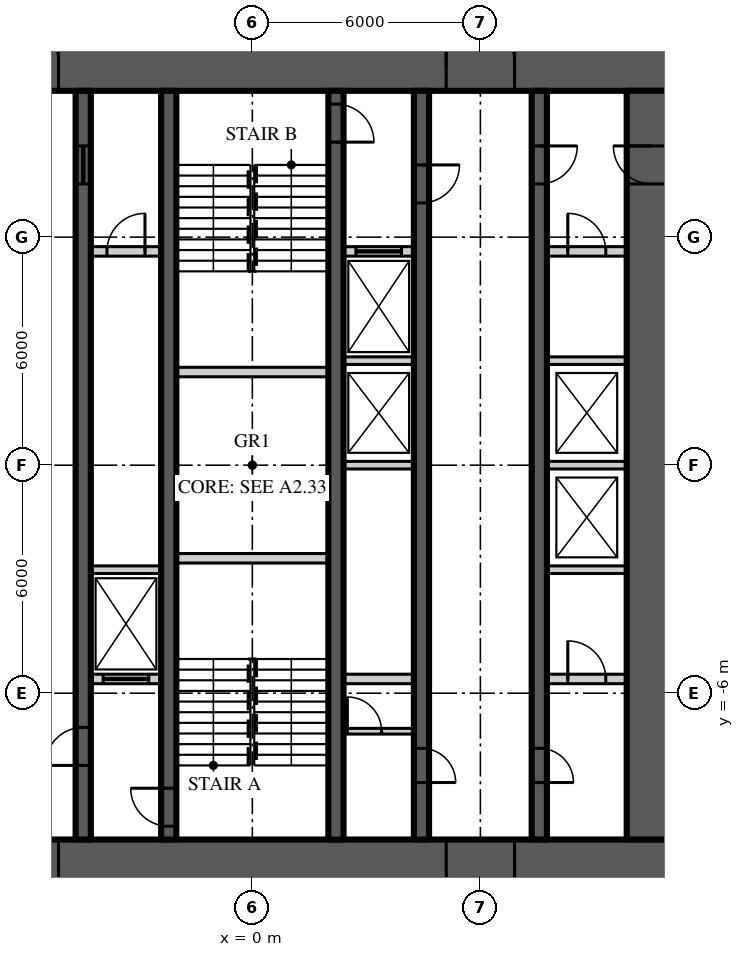
"""IFC4 building model, lengths in metres.
Left out: names, types, materials, properties, quantities, classifications, styles, units other than length and angle.
Written with IfcOpenShell. Run it as: python <this file> out.ifc"""

import sys

from ifc_helpers import new_model, si_unit, direction, frame, frame_2d, origin, place, context, subcontext, project, spatial, rectangle, extrude, element, fill, save


model = new_model("IFC4")
c1 = context("Model", 3, precision=1e-05, world=origin(), true_north=direction((0.0, 1.0)))
c2 = subcontext(c1, "Body", "Model", "MODEL_VIEW")
j1 = project(units=[si_unit("LENGTHUNIT", "METRE"), si_unit("PLANEANGLEUNIT", "RADIAN")], contexts=[c1])
p1 = place(None, origin())
s1 = spatial("IfcSite", under=j1, at=p1, CompositionType="ELEMENT")
p2 = place(p1, origin())
s2 = spatial("IfcBuilding", under=s1, at=p2, CompositionType="ELEMENT")
p3 = place(p2, frame((0.0, 0.0, 251.7)))
s3 = spatial("IfcBuildingStorey", under=s2, at=p3, CompositionType="ELEMENT", Elevation=251.7)
p4 = place(p3, frame((-11.15, 10.5, 0.0), z_axis=(0.0, 0.0, 1.0), x_axis=(1.0, 0.0, 0.0)))
e1 = element("IfcWall", 1, at=p4, inside=s3, PredefinedType="SHEAR", context=c2, shape_type="SweptSolid", body=[
    extrude(rectangle(XDim=22.3, YDim=1.3, at=frame_2d((11.15, 0.0))), origin(), (0.0, 0.0, 1.0), 3.9),
])
p5 = place(p4, frame((4.25, 0.0, 0.0)))
e2 = element("IfcOpeningElement", 2, at=p5, cuts=e1, PredefinedType="OPENING", context=c2, shape_type="SweptSolid", body=[
    extrude(rectangle(XDim=1.8, YDim=2.2, at=frame_2d((0.9, 1.1))), frame((0.0, 0.66, 0.0), z_axis=(0.0, -1.0, 0.0), x_axis=(1.0, 0.0, 0.0)), (0.0, 0.0, 1.0), 1.32),
])
p6 = place(p4, frame((16.25, 0.0, 0.0)))
e3 = element("IfcOpeningElement", 3, at=p6, cuts=e1, PredefinedType="OPENING", context=c2, shape_type="SweptSolid", body=[
    extrude(rectangle(XDim=1.8, YDim=2.2, at=frame_2d((0.9, 1.1))), frame((0.0, 0.66, 0.0), z_axis=(0.0, -1.0, 0.0), x_axis=(1.0, 0.0, 0.0)), (0.0, 0.0, 1.0), 1.32),
])
p7 = place(p3, frame((11.15, -10.5, 0.0), z_axis=(0.0, 0.0, 1.0), x_axis=(-1.0, 0.0, 0.0)))
e4 = element("IfcWall", 4, at=p7, inside=s3, PredefinedType="SHEAR", context=c2, shape_type="SweptSolid", body=[
    extrude(rectangle(XDim=22.3, YDim=1.3, at=frame_2d((11.15, 0.0))), origin(), (0.0, 0.0, 1.0), 3.9),
])
p8 = place(p7, frame((16.25, 0.0, 0.0)))
e5 = element("IfcOpeningElement", 5, at=p8, cuts=e4, PredefinedType="OPENING", context=c2, shape_type="SweptSolid", body=[
    extrude(rectangle(XDim=1.8, YDim=2.2, at=frame_2d((0.9, 1.1))), frame((0.0, 0.66, 0.0), z_axis=(0.0, -1.0, 0.0), x_axis=(1.0, 0.0, 0.0)), (0.0, 0.0, 1.0), 1.32),
])
p9 = place(p7, frame((4.25, 0.0, 0.0)))
e6 = element("IfcOpeningElement", 6, at=p9, cuts=e4, PredefinedType="OPENING", context=c2, shape_type="SweptSolid", body=[
    extrude(rectangle(XDim=1.8, YDim=2.2, at=frame_2d((0.9, 1.1))), frame((0.0, 0.66, 0.0), z_axis=(0.0, -1.0, 0.0), x_axis=(1.0, 0.0, 0.0)), (0.0, 0.0, 1.0), 1.32),
])
p10 = place(p3, frame((10.5, -9.85, 0.0), z_axis=(0.0, 0.0, 1.0), x_axis=(0.0, 1.0, 0.0)))
e7 = element("IfcWall", 7, at=p10, inside=s3, PredefinedType="SHEAR", context=c2, shape_type="SweptSolid", body=[
    extrude(rectangle(XDim=19.7, YDim=1.3, at=frame_2d((9.85, 0.0))), origin(), (0.0, 0.0, 1.0), 3.9),
])
p11 = place(p10, frame((17.25, 0.0, 0.0)))
e8 = element("IfcOpeningElement", 8, at=p11, cuts=e7, PredefinedType="OPENING", context=c2, shape_type="SweptSolid", body=[
    extrude(rectangle(XDim=1.0, YDim=2.2, at=frame_2d((0.5, 1.1))), frame((0.0, 0.66, 0.0), z_axis=(0.0, -1.0, 0.0), x_axis=(1.0, 0.0, 0.0)), (0.0, 0.0, 1.0), 1.32),
])
p12 = place(p3, frame((7.55, 9.85, 0.0), z_axis=(0.0, 0.0, 1.0), x_axis=(0.0, -1.0, 0.0)))
e9 = element("IfcWall", 9, at=p12, inside=s3, PredefinedType="SHEAR", context=c2, shape_type="SweptSolid", body=[
    extrude(rectangle(XDim=19.7, YDim=0.4, at=frame_2d((9.85, 0.0))), origin(), (0.0, 0.0, 1.0), 3.9),
])
p13 = place(p12, frame((1.45, 0.0, 0.0)))
e10 = element("IfcOpeningElement", 10, at=p13, cuts=e9, PredefinedType="OPENING", context=c2, shape_type="SweptSolid", body=[
    extrude(rectangle(XDim=1.0, YDim=2.2, at=frame_2d((0.5, 1.1))), frame((0.0, 0.21, 0.0), z_axis=(0.0, -1.0, 0.0), x_axis=(1.0, 0.0, 0.0)), (0.0, 0.0, 1.0), 0.42),
])
p14 = place(p12, frame((17.3, 0.0, 0.0)))
e11 = element("IfcOpeningElement", 11, at=p14, cuts=e9, PredefinedType="OPENING", context=c2, shape_type="SweptSolid", body=[
    extrude(rectangle(XDim=0.9, YDim=2.1, at=frame_2d((0.45, 1.05))), frame((0.0, 0.21, 0.0), z_axis=(0.0, -1.0, 0.0), x_axis=(1.0, 0.0, 0.0)), (0.0, 0.0, 1.0), 0.42),
])
p15 = place(p3, frame((-4.45, -9.85, 0.0), z_axis=(0.0, 0.0, 1.0), x_axis=(0.0, 1.0, 0.0)))
e12 = element("IfcWall", 12, at=p15, inside=s3, PredefinedType="SHEAR", context=c2, shape_type="SweptSolid", body=[
    extrude(rectangle(XDim=19.7, YDim=0.4, at=frame_2d((9.85, 0.0))), origin(), (0.0, 0.0, 1.0), 3.9),
])
p16 = place(p15, frame((1.95, 0.0, 0.0)))
e13 = element("IfcOpeningElement", 13, at=p16, cuts=e12, PredefinedType="OPENING", context=c2, shape_type="SweptSolid", body=[
    extrude(rectangle(XDim=1.0, YDim=2.2, at=frame_2d((0.5, 1.1))), frame((0.0, 0.21, 0.0), z_axis=(0.0, -1.0, 0.0), x_axis=(1.0, 0.0, 0.0)), (0.0, 0.0, 1.0), 0.42),
])
p17 = place(p15, frame((17.25, 0.0, 0.0)))
e14 = element("IfcOpeningElement", 14, at=p17, cuts=e12, PredefinedType="OPENING", context=c2, shape_type="SweptSolid", body=[
    extrude(rectangle(XDim=1.0, YDim=2.1, at=frame_2d((0.5, 1.05))), frame((0.0, 0.21, 0.0), z_axis=(0.0, -1.0, 0.0), x_axis=(1.0, 0.0, 0.0)), (0.0, 0.0, 1.0), 0.42),
])
p18 = place(p3, frame((4.45, 9.85, 0.0), z_axis=(0.0, 0.0, 1.0), x_axis=(0.0, -1.0, 0.0)))
e15 = element("IfcWall", 15, at=p18, inside=s3, PredefinedType="SHEAR", context=c2, shape_type="SweptSolid", body=[
    extrude(rectangle(XDim=19.7, YDim=0.4, at=frame_2d((9.85, 0.0))), origin(), (0.0, 0.0, 1.0), 3.9),
])
p19 = place(p18, frame((1.95, 0.0, 0.0)))
e16 = element("IfcOpeningElement", 16, at=p19, cuts=e15, PredefinedType="OPENING", context=c2, shape_type="SweptSolid", body=[
    extrude(rectangle(XDim=1.0, YDim=2.2, at=frame_2d((0.5, 1.1))), frame((0.0, 0.21, 0.0), z_axis=(0.0, -1.0, 0.0), x_axis=(1.0, 0.0, 0.0)), (0.0, 0.0, 1.0), 0.42),
])
p20 = place(p18, frame((17.3, 0.0, 0.0)))
e17 = element("IfcOpeningElement", 17, at=p20, cuts=e15, PredefinedType="OPENING", context=c2, shape_type="SweptSolid", body=[
    extrude(rectangle(XDim=0.9, YDim=2.1, at=frame_2d((0.45, 1.05))), frame((0.0, 0.21, 0.0), z_axis=(0.0, -1.0, 0.0), x_axis=(1.0, 0.0, 0.0)), (0.0, 0.0, 1.0), 0.42),
])
p21 = place(p3, frame((-2.2, -9.85, 0.0), z_axis=(0.0, 0.0, 1.0), x_axis=(0.0, 1.0, 0.0)))
e18 = element("IfcWall", 18, at=p21, inside=s3, PredefinedType="SHEAR", context=c2, shape_type="SweptSolid", body=[
    extrude(rectangle(XDim=19.7, YDim=0.4, at=frame_2d((9.85, 0.0))), origin(), (0.0, 0.0, 1.0), 3.9),
])
p22 = place(p21, frame((0.35, 0.0, 0.0)))
e19 = element("IfcOpeningElement", 19, at=p22, cuts=e18, PredefinedType="OPENING", context=c2, shape_type="SweptSolid", body=[
    extrude(rectangle(XDim=1.0, YDim=2.2, at=frame_2d((0.5, 1.1))), frame((0.0, 0.21, 0.0), z_axis=(0.0, -1.0, 0.0), x_axis=(1.0, 0.0, 0.0)), (0.0, 0.0, 1.0), 0.42),
])
p23 = place(p3, frame((2.2, 9.85, 0.0), z_axis=(0.0, 0.0, 1.0), x_axis=(0.0, -1.0, 0.0)))
e20 = element("IfcWall", 20, at=p23, inside=s3, PredefinedType="SHEAR", context=c2, shape_type="SweptSolid", body=[
    extrude(rectangle(XDim=19.7, YDim=0.4, at=frame_2d((9.85, 0.0))), origin(), (0.0, 0.0, 1.0), 3.9),
])
p24 = place(p23, frame((0.35, 0.0, 0.0)))
e21 = element("IfcOpeningElement", 21, at=p24, cuts=e20, PredefinedType="OPENING", context=c2, shape_type="SweptSolid", body=[
    extrude(rectangle(XDim=1.0, YDim=2.2, at=frame_2d((0.5, 1.1))), frame((0.0, 0.21, 0.0), z_axis=(0.0, -1.0, 0.0), x_axis=(1.0, 0.0, 0.0)), (0.0, 0.0, 1.0), 0.42),
])
p25 = place(p3, frame((-4.25, 5.625, 0.0), z_axis=(0.0, 0.0, 1.0), x_axis=(1.0, 0.0, 0.0)))
e22 = element("IfcWall", 22, at=p25, inside=s3, PredefinedType="SOLIDWALL", context=c2, shape_type="SweptSolid", body=[
    extrude(rectangle(XDim=1.85, YDim=0.25, at=frame_2d((0.925, 0.0))), origin(), (0.0, 0.0, 1.0), 3.7),
])
p26 = place(p25, frame((0.425, 0.0, 0.0)))
e23 = element("IfcOpeningElement", 23, at=p26, cuts=e22, PredefinedType="OPENING", context=c2, shape_type="SweptSolid", body=[
    extrude(rectangle(XDim=1.0, YDim=2.2, at=frame_2d((0.5, 1.1))), frame((0.0, 0.135, 0.0), z_axis=(0.0, -1.0, 0.0), x_axis=(1.0, 0.0, 0.0)), (0.0, 0.0, 1.0), 0.27),
])
p27 = place(p3, frame((2.4, 5.625, 0.0), z_axis=(0.0, 0.0, 1.0), x_axis=(1.0, 0.0, 0.0)))
e24 = element("IfcWall", 24, at=p27, inside=s3, PredefinedType="SOLIDWALL", context=c2, shape_type="SweptSolid", body=[
    extrude(rectangle(XDim=1.85, YDim=0.25, at=frame_2d((0.925, 0.0))), origin(), (0.0, 0.0, 1.0), 3.7),
])
p28 = place(p27, frame((0.325, 0.0, 0.0)))
e25 = element("IfcOpeningElement", 25, at=p28, cuts=e24, PredefinedType="OPENING", context=c2, shape_type="SweptSolid", body=[
    extrude(rectangle(XDim=1.2, YDim=2.2, at=frame_2d((0.6, 1.1))), frame((0.0, 0.135, 0.0), z_axis=(0.0, -1.0, 0.0), x_axis=(1.0, 0.0, 0.0)), (0.0, 0.0, 1.0), 0.27),
])
p29 = place(p3, frame((7.75, 5.625, 0.0), z_axis=(0.0, 0.0, 1.0), x_axis=(1.0, 0.0, 0.0)))
e26 = element("IfcWall", 26, at=p29, inside=s3, PredefinedType="SOLIDWALL", context=c2, shape_type="SweptSolid", body=[
    extrude(rectangle(XDim=2.1, YDim=0.25, at=frame_2d((1.05, 0.0))), origin(), (0.0, 0.0, 1.0), 3.7),
])
p30 = place(p29, frame((0.55, 0.0, 0.0)))
e27 = element("IfcOpeningElement", 27, at=p30, cuts=e26, PredefinedType="OPENING", context=c2, shape_type="SweptSolid", body=[
    extrude(rectangle(XDim=1.0, YDim=2.2, at=frame_2d((0.5, 1.1))), frame((0.0, 0.135, 0.0), z_axis=(0.0, -1.0, 0.0), x_axis=(1.0, 0.0, 0.0)), (0.0, 0.0, 1.0), 0.27),
])
p31 = place(p3, frame((-4.25, -5.625, 0.0), z_axis=(0.0, 0.0, 1.0), x_axis=(1.0, 0.0, 0.0)))
e28 = element("IfcWall", 28, at=p31, inside=s3, PredefinedType="SOLIDWALL", context=c2, shape_type="SweptSolid", body=[
    extrude(rectangle(XDim=1.85, YDim=0.25, at=frame_2d((0.925, 0.0))), origin(), (0.0, 0.0, 1.0), 3.7),
])
p32 = place(p31, frame((0.325, 0.0, 0.0)))
e29 = element("IfcOpeningElement", 29, at=p32, cuts=e28, PredefinedType="OPENING", context=c2, shape_type="SweptSolid", body=[
    extrude(rectangle(XDim=1.2, YDim=2.2, at=frame_2d((0.6, 1.1))), frame((0.0, 0.135, 0.0), z_axis=(0.0, -1.0, 0.0), x_axis=(1.0, 0.0, 0.0)), (0.0, 0.0, 1.0), 0.27),
])
p33 = place(p3, frame((2.4, -5.625, 0.0), z_axis=(0.0, 0.0, 1.0), x_axis=(1.0, 0.0, 0.0)))
e30 = element("IfcWall", 30, at=p33, inside=s3, PredefinedType="SOLIDWALL", context=c2, shape_type="SweptSolid", body=[
    extrude(rectangle(XDim=1.85, YDim=0.25, at=frame_2d((0.925, 0.0))), origin(), (0.0, 0.0, 1.0), 3.7),
])
p34 = place(p3, frame((7.75, -5.625, 0.0), z_axis=(0.0, 0.0, 1.0), x_axis=(1.0, 0.0, 0.0)))
e31 = element("IfcWall", 31, at=p34, inside=s3, PredefinedType="SOLIDWALL", context=c2, shape_type="SweptSolid", body=[
    extrude(rectangle(XDim=2.1, YDim=0.25, at=frame_2d((1.05, 0.0))), origin(), (0.0, 0.0, 1.0), 3.7),
])
p35 = place(p34, frame((0.55, 0.0, 0.0)))
e32 = element("IfcOpeningElement", 32, at=p35, cuts=e31, PredefinedType="OPENING", context=c2, shape_type="SweptSolid", body=[
    extrude(rectangle(XDim=1.0, YDim=2.2, at=frame_2d((0.5, 1.1))), frame((0.0, 0.135, 0.0), z_axis=(0.0, -1.0, 0.0), x_axis=(1.0, 0.0, 0.0)), (0.0, 0.0, 1.0), 0.27),
])
for number, where, z_axis, x_axis in (
    (33, (-2.0, -2.45, 0.0), (0.0, 0.0, 1.0), (1.0, 0.0, 0.0)),
    (34, (-2.0, 2.45, 0.0), (0.0, 0.0, 1.0), (1.0, 0.0, 0.0)),
):
    element("IfcWall", number, at=place(p3, frame(where, z_axis=z_axis, x_axis=x_axis)), inside=s3, PredefinedType="SOLIDWALL", context=c2, shape_type="SweptSolid", body=[
        extrude(rectangle(XDim=4.0, YDim=0.25, at=frame_2d((2.0, 0.0))), origin(), (0.0, 0.0, 1.0), 3.7),
    ])
p36 = place(p3, frame((-4.25, -2.75, 0.0), z_axis=(0.0, 0.0, 1.0), x_axis=(1.0, 0.0, 0.0)))
e35 = element("IfcWall", 35, at=p36, inside=s3, PredefinedType="SOLIDWALL", context=c2, shape_type="SweptSolid", body=[
    extrude(rectangle(XDim=1.85, YDim=0.2, at=frame_2d((0.925, 0.0))), origin(), (0.0, 0.0, 1.0), 3.7),
])
p37 = place(p3, frame((7.75, -2.75, 0.0), z_axis=(0.0, 0.0, 1.0), x_axis=(1.0, 0.0, 0.0)))
e36 = element("IfcWall", 36, at=p37, inside=s3, PredefinedType="SOLIDWALL", context=c2, shape_type="SweptSolid", body=[
    extrude(rectangle(XDim=2.1, YDim=0.2, at=frame_2d((1.05, 0.0))), origin(), (0.0, 0.0, 1.0), 3.7),
])
p38 = place(p3, frame((2.4, 0.0, 0.0), z_axis=(0.0, 0.0, 1.0), x_axis=(1.0, 0.0, 0.0)))
e37 = element("IfcWall", 37, at=p38, inside=s3, PredefinedType="SOLIDWALL", context=c2, shape_type="SweptSolid", body=[
    extrude(rectangle(XDim=1.85, YDim=0.2, at=frame_2d((0.925, 0.0))), origin(), (0.0, 0.0, 1.0), 3.7),
])
p39 = place(p3, frame((7.75, 0.0, 0.0), z_axis=(0.0, 0.0, 1.0), x_axis=(1.0, 0.0, 0.0)))
e38 = element("IfcWall", 38, at=p39, inside=s3, PredefinedType="SOLIDWALL", context=c2, shape_type="SweptSolid", body=[
    extrude(rectangle(XDim=2.1, YDim=0.2, at=frame_2d((1.05, 0.0))), origin(), (0.0, 0.0, 1.0), 3.7),
])
p40 = place(p3, frame((2.4, 2.75, 0.0), z_axis=(0.0, 0.0, 1.0), x_axis=(1.0, 0.0, 0.0)))
e39 = element("IfcWall", 39, at=p40, inside=s3, PredefinedType="SOLIDWALL", context=c2, shape_type="SweptSolid", body=[
    extrude(rectangle(XDim=1.85, YDim=0.2, at=frame_2d((0.925, 0.0))), origin(), (0.0, 0.0, 1.0), 3.7),
])
p41 = place(p3, frame((7.75, 2.75, 0.0), z_axis=(0.0, 0.0, 1.0), x_axis=(1.0, 0.0, 0.0)))
e40 = element("IfcWall", 40, at=p41, inside=s3, PredefinedType="SOLIDWALL", context=c2, shape_type="SweptSolid", body=[
    extrude(rectangle(XDim=2.1, YDim=0.2, at=frame_2d((1.05, 0.0))), origin(), (0.0, 0.0, 1.0), 3.7),
])
p42 = place(p3, frame((2.4, -7.0, 0.0), z_axis=(0.0, 0.0, 1.0), x_axis=(1.0, 0.0, 0.0)))
e41 = element("IfcWall", 41, at=p42, inside=s3, PredefinedType="SOLIDWALL", context=c2, shape_type="SweptSolid", body=[
    extrude(rectangle(XDim=1.85, YDim=0.15, at=frame_2d((0.925, 0.0))), origin(), (0.0, 0.0, 1.0), 3.77),
])
p43 = place(p42, frame((0.1, 0.0, 0.0)))
e42 = element("IfcOpeningElement", 42, at=p43, cuts=e41, PredefinedType="OPENING", context=c2, shape_type="SweptSolid", body=[
    extrude(rectangle(XDim=0.9, YDim=2.1, at=frame_2d((0.45, 1.05))), frame((0.0, 0.085, 0.0), z_axis=(0.0, -1.0, 0.0), x_axis=(1.0, 0.0, 0.0)), (0.0, 0.0, 1.0), 0.17),
])
p44 = place(p5, origin())
e43 = element("IfcDoor", 43, at=p44, inside=s3, OperationType="DOUBLE_DOOR_DOUBLE_SWING", PredefinedType="DOOR", context=c2, shape_type="SweptSolid", body=[
    extrude(rectangle(XDim=1.8, YDim=2.2, at=frame_2d((0.9, 1.1))), frame((0.0, 0.025, 0.0), z_axis=(0.0, -1.0, 0.0), x_axis=(1.0, 0.0, 0.0)), (0.0, 0.0, 1.0), 0.05),
])
fill(e2, e43)
p45 = place(p8, origin())
e44 = element("IfcDoor", 44, at=p45, inside=s3, OperationType="DOUBLE_DOOR_DOUBLE_SWING", PredefinedType="DOOR", context=c2, shape_type="SweptSolid", body=[
    extrude(rectangle(XDim=1.8, YDim=2.2, at=frame_2d((0.9, 1.1))), frame((0.0, 0.025, 0.0), z_axis=(0.0, -1.0, 0.0), x_axis=(1.0, 0.0, 0.0)), (0.0, 0.0, 1.0), 0.05),
])
fill(e5, e44)
p46 = place(p6, origin())
e45 = element("IfcDoor", 45, at=p46, inside=s3, OperationType="DOUBLE_DOOR_DOUBLE_SWING", PredefinedType="DOOR", context=c2, shape_type="SweptSolid", body=[
    extrude(rectangle(XDim=1.8, YDim=2.2, at=frame_2d((0.9, 1.1))), frame((0.0, 0.025, 0.0), z_axis=(0.0, -1.0, 0.0), x_axis=(1.0, 0.0, 0.0)), (0.0, 0.0, 1.0), 0.05),
])
fill(e3, e45)
p47 = place(p9, origin())
e46 = element("IfcDoor", 46, at=p47, inside=s3, OperationType="DOUBLE_DOOR_DOUBLE_SWING", PredefinedType="DOOR", context=c2, shape_type="SweptSolid", body=[
    extrude(rectangle(XDim=1.8, YDim=2.2, at=frame_2d((0.9, 1.1))), frame((0.0, 0.025, 0.0), z_axis=(0.0, -1.0, 0.0), x_axis=(1.0, 0.0, 0.0)), (0.0, 0.0, 1.0), 0.05),
])
fill(e6, e46)
p48 = place(p13, origin())
e47 = element("IfcDoor", 47, at=p48, inside=s3, OperationType="SINGLE_SWING_LEFT", PredefinedType="DOOR", context=c2, shape_type="SweptSolid", body=[
    extrude(rectangle(XDim=1.0, YDim=2.2, at=frame_2d((0.5, 1.1))), frame((0.0, 0.025, 0.0), z_axis=(0.0, -1.0, 0.0), x_axis=(1.0, 0.0, 0.0)), (0.0, 0.0, 1.0), 0.05),
])
fill(e10, e47)
p49 = place(p11, origin())
e48 = element("IfcDoor", 48, at=p49, inside=s3, OperationType="SINGLE_SWING_RIGHT", PredefinedType="DOOR", context=c2, shape_type="SweptSolid", body=[
    extrude(rectangle(XDim=1.0, YDim=2.2, at=frame_2d((0.5, 1.1))), frame((0.0, 0.025, 0.0), z_axis=(0.0, -1.0, 0.0), x_axis=(1.0, 0.0, 0.0)), (0.0, 0.0, 1.0), 0.05),
])
fill(e8, e48)
p50 = place(p16, origin())
e49 = element("IfcDoor", 49, at=p50, inside=s3, OperationType="SINGLE_SWING_LEFT", PredefinedType="DOOR", context=c2, shape_type="SweptSolid", body=[
    extrude(rectangle(XDim=1.0, YDim=2.2, at=frame_2d((0.5, 1.1))), frame((0.0, 0.025, 0.0), z_axis=(0.0, -1.0, 0.0), x_axis=(1.0, 0.0, 0.0)), (0.0, 0.0, 1.0), 0.05),
])
fill(e13, e49)
p51 = place(p22, origin())
e50 = element("IfcDoor", 50, at=p51, inside=s3, OperationType="SINGLE_SWING_RIGHT", PredefinedType="DOOR", context=c2, shape_type="SweptSolid", body=[
    extrude(rectangle(XDim=1.0, YDim=2.2, at=frame_2d((0.5, 1.1))), frame((0.0, 0.025, 0.0), z_axis=(0.0, -1.0, 0.0), x_axis=(1.0, 0.0, 0.0)), (0.0, 0.0, 1.0), 0.05),
])
fill(e19, e50)
p52 = place(p19, origin())
e51 = element("IfcDoor", 51, at=p52, inside=s3, OperationType="SINGLE_SWING_LEFT", PredefinedType="DOOR", context=c2, shape_type="SweptSolid", body=[
    extrude(rectangle(XDim=1.0, YDim=2.2, at=frame_2d((0.5, 1.1))), frame((0.0, 0.025, 0.0), z_axis=(0.0, -1.0, 0.0), x_axis=(1.0, 0.0, 0.0)), (0.0, 0.0, 1.0), 0.05),
])
fill(e16, e51)
p53 = place(p24, origin())
e52 = element("IfcDoor", 52, at=p53, inside=s3, OperationType="SINGLE_SWING_RIGHT", PredefinedType="DOOR", context=c2, shape_type="SweptSolid", body=[
    extrude(rectangle(XDim=1.0, YDim=2.2, at=frame_2d((0.5, 1.1))), frame((0.0, 0.025, 0.0), z_axis=(0.0, -1.0, 0.0), x_axis=(1.0, 0.0, 0.0)), (0.0, 0.0, 1.0), 0.05),
])
fill(e21, e52)
p54 = place(p17, origin())
e53 = element("IfcDoor", 53, at=p54, inside=s3, OperationType="SLIDING_TO_LEFT", PredefinedType="DOOR", context=c2, shape_type="SweptSolid", body=[
    extrude(rectangle(XDim=1.0, YDim=2.1, at=frame_2d((0.5, 1.05))), frame((0.0, 0.025, 0.0), z_axis=(0.0, -1.0, 0.0), x_axis=(1.0, 0.0, 0.0)), (0.0, 0.0, 1.0), 0.05),
])
fill(e14, e53)
p55 = place(p14, origin())
e54 = element("IfcDoor", 54, at=p55, inside=s3, OperationType="SINGLE_SWING_RIGHT", PredefinedType="DOOR", context=c2, shape_type="SweptSolid", body=[
    extrude(rectangle(XDim=0.9, YDim=2.1, at=frame_2d((0.45, 1.05))), frame((0.0, 0.025, 0.0), z_axis=(0.0, -1.0, 0.0), x_axis=(1.0, 0.0, 0.0)), (0.0, 0.0, 1.0), 0.05),
])
fill(e11, e54)
p56 = place(p20, origin())
e55 = element("IfcDoor", 55, at=p56, inside=s3, OperationType="SINGLE_SWING_RIGHT", PredefinedType="DOOR", context=c2, shape_type="SweptSolid", body=[
    extrude(rectangle(XDim=0.9, YDim=2.1, at=frame_2d((0.45, 1.05))), frame((0.0, 0.025, 0.0), z_axis=(0.0, -1.0, 0.0), x_axis=(1.0, 0.0, 0.0)), (0.0, 0.0, 1.0), 0.05),
])
fill(e17, e55)
p57 = place(p32, origin())
e56 = element("IfcDoor", 56, at=p57, inside=s3, OperationType="SLIDING_TO_LEFT", PredefinedType="DOOR", context=c2, shape_type="SweptSolid", body=[
    extrude(rectangle(XDim=1.2, YDim=2.2, at=frame_2d((0.6, 1.1))), frame((0.0, 0.025, 0.0), z_axis=(0.0, -1.0, 0.0), x_axis=(1.0, 0.0, 0.0)), (0.0, 0.0, 1.0), 0.05),
])
fill(e29, e56)
p58 = place(p28, origin())
e57 = element("IfcDoor", 57, at=p58, inside=s3, OperationType="SLIDING_TO_LEFT", PredefinedType="DOOR", context=c2, shape_type="SweptSolid", body=[
    extrude(rectangle(XDim=1.2, YDim=2.2, at=frame_2d((0.6, 1.1))), frame((0.0, 0.025, 0.0), z_axis=(0.0, -1.0, 0.0), x_axis=(1.0, 0.0, 0.0)), (0.0, 0.0, 1.0), 0.05),
])
fill(e25, e57)
p59 = place(p26, origin())
e58 = element("IfcDoor", 58, at=p59, inside=s3, OperationType="SINGLE_SWING_RIGHT", PredefinedType="DOOR", context=c2, shape_type="SweptSolid", body=[
    extrude(rectangle(XDim=1.0, YDim=2.2, at=frame_2d((0.5, 1.1))), frame((0.0, 0.025, 0.0), z_axis=(0.0, -1.0, 0.0), x_axis=(1.0, 0.0, 0.0)), (0.0, 0.0, 1.0), 0.05),
])
fill(e23, e58)
p60 = place(p30, origin())
e59 = element("IfcDoor", 59, at=p60, inside=s3, OperationType="SINGLE_SWING_LEFT", PredefinedType="DOOR", context=c2, shape_type="SweptSolid", body=[
    extrude(rectangle(XDim=1.0, YDim=2.2, at=frame_2d((0.5, 1.1))), frame((0.0, 0.025, 0.0), z_axis=(0.0, -1.0, 0.0), x_axis=(1.0, 0.0, 0.0)), (0.0, 0.0, 1.0), 0.05),
])
fill(e27, e59)
p61 = place(p35, origin())
e60 = element("IfcDoor", 60, at=p61, inside=s3, OperationType="SINGLE_SWING_LEFT", PredefinedType="DOOR", context=c2, shape_type="SweptSolid", body=[
    extrude(rectangle(XDim=1.0, YDim=2.2, at=frame_2d((0.5, 1.1))), frame((0.0, 0.025, 0.0), z_axis=(0.0, -1.0, 0.0), x_axis=(1.0, 0.0, 0.0)), (0.0, 0.0, 1.0), 0.05),
])
fill(e32, e60)
p62 = place(p43, origin())
e61 = element("IfcDoor", 61, at=p62, inside=s3, OperationType="SINGLE_SWING_LEFT", PredefinedType="DOOR", context=c2, shape_type="SweptSolid", body=[
    extrude(rectangle(XDim=0.9, YDim=2.1, at=frame_2d((0.45, 1.05))), frame((0.0, 0.025, 0.0), z_axis=(0.0, -1.0, 0.0), x_axis=(1.0, 0.0, 0.0)), (0.0, 0.0, 1.0), 0.05),
])
fill(e42, e61)
save(model, sys.argv[1])
